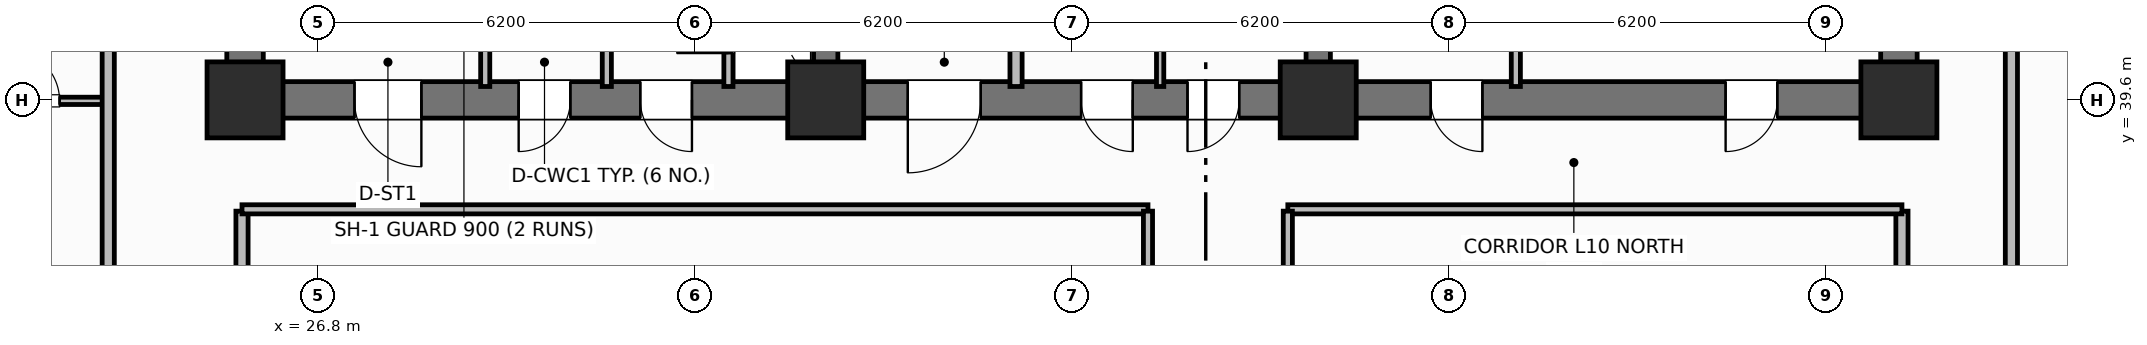
"""IFC4 building model, lengths in metres.
Left out: names, types, materials, properties, quantities, classifications, styles, units other than length and angle.
Written with IfcOpenShell. Run it as: python <this file> out.ifc"""

import sys

from ifc_helpers import new_model, si_unit, direction, frame, frame_2d, origin, origin_2d, place, context, subcontext, project, spatial, rectangle, extrude, element, fill, save


model = new_model("IFC4")
c1 = context("Model", 3, precision=1e-05, world=origin(), true_north=direction((0.0, 1.0)))
c2 = subcontext(c1, "Body", "Model", "MODEL_VIEW")
j1 = project(units=[si_unit("LENGTHUNIT", "METRE"), si_unit("PLANEANGLEUNIT", "RADIAN")], contexts=[c1])
p1 = place(None, origin())
s1 = spatial("IfcSite", under=j1, at=p1, CompositionType="ELEMENT")
p2 = place(p1, origin())
s2 = spatial("IfcBuilding", under=s1, at=p2, CompositionType="ELEMENT")
p3 = place(p2, frame((0.0, 0.0, 43.6)))
s3 = spatial("IfcBuildingStorey", under=s2, at=p3, CompositionType="ELEMENT", Elevation=43.6)
for number, where, z_axis, x_axis in (
    (1, (25.6, 39.9, 0.0), (0.0, 0.0, 1.0), (0.0, 1.0, 0.0)),
    (2, (52.8, 39.9, 0.0), (0.0, 0.0, 1.0), (0.0, 1.0, 0.0)),
):
    element("IfcWall", number, at=place(p3, frame(where, z_axis=z_axis, x_axis=x_axis)), inside=s3, PredefinedType="SHEAR", context=c2, shape_type="SweptSolid", body=[
        extrude(rectangle(XDim=5.6, YDim=0.6, at=frame_2d((2.8, 0.0))), origin(), (0.0, 0.0, 1.0), 3.7),
    ])
p4 = place(p3, frame((52.8, 39.6, 0.0), z_axis=(0.0, 0.0, 1.0), x_axis=(-1.0, 0.0, 0.0)))
e3 = element("IfcWall", 3, at=p4, inside=s3, PredefinedType="SHEAR", context=c2, shape_type="SweptSolid", body=[
    extrude(rectangle(XDim=27.2, YDim=0.6, at=frame_2d((13.6, 0.0))), origin(), (0.0, 0.0, 1.0), 3.7),
])
p5 = place(p4, frame((24.3, 0.0, 0.0)))
e4 = element("IfcOpeningElement", 4, at=p5, cuts=e3, PredefinedType="OPENING", context=c2, shape_type="SweptSolid", body=[
    extrude(rectangle(XDim=1.1, YDim=2.15, at=frame_2d((0.55, 1.075))), frame((0.0, 0.31, 0.0), z_axis=(0.0, -1.0, 0.0), x_axis=(1.0, 0.0, 0.0)), (0.0, 0.0, 1.0), 0.62),
])
p6 = place(p4, frame((21.85, 0.0, 0.0)))
e5 = element("IfcOpeningElement", 5, at=p6, cuts=e3, PredefinedType="OPENING", context=c2, shape_type="SweptSolid", body=[
    extrude(rectangle(XDim=0.85, YDim=2.1, at=frame_2d((0.425, 1.05))), frame((0.0, 0.31, 0.0), z_axis=(0.0, -1.0, 0.0), x_axis=(1.0, 0.0, 0.0)), (0.0, 0.0, 1.0), 0.62),
])
p7 = place(p4, frame((19.85, 0.0, 0.0)))
e6 = element("IfcOpeningElement", 6, at=p7, cuts=e3, PredefinedType="OPENING", context=c2, shape_type="SweptSolid", body=[
    extrude(rectangle(XDim=0.85, YDim=2.1, at=frame_2d((0.425, 1.05))), frame((0.0, 0.31, 0.0), z_axis=(0.0, -1.0, 0.0), x_axis=(1.0, 0.0, 0.0)), (0.0, 0.0, 1.0), 0.62),
])
p8 = place(p4, frame((15.1, 0.0, 0.0)))
e7 = element("IfcOpeningElement", 7, at=p8, cuts=e3, PredefinedType="OPENING", context=c2, shape_type="SweptSolid", body=[
    extrude(rectangle(XDim=1.2, YDim=2.15, at=frame_2d((0.6, 1.075))), frame((0.0, 0.31, 0.0), z_axis=(0.0, -1.0, 0.0), x_axis=(1.0, 0.0, 0.0)), (0.0, 0.0, 1.0), 0.62),
])
p9 = place(p4, frame((12.6, 0.0, 0.0)))
e8 = element("IfcOpeningElement", 8, at=p9, cuts=e3, PredefinedType="OPENING", context=c2, shape_type="SweptSolid", body=[
    extrude(rectangle(XDim=0.85, YDim=2.1, at=frame_2d((0.425, 1.05))), frame((0.0, 0.31, 0.0), z_axis=(0.0, -1.0, 0.0), x_axis=(1.0, 0.0, 0.0)), (0.0, 0.0, 1.0), 0.62),
])
p10 = place(p4, frame((10.85, 0.0, 0.0)))
e9 = element("IfcOpeningElement", 9, at=p10, cuts=e3, PredefinedType="OPENING", context=c2, shape_type="SweptSolid", body=[
    extrude(rectangle(XDim=0.85, YDim=2.1, at=frame_2d((0.425, 1.05))), frame((0.0, 0.31, 0.0), z_axis=(0.0, -1.0, 0.0), x_axis=(1.0, 0.0, 0.0)), (0.0, 0.0, 1.0), 0.62),
])
p11 = place(p4, frame((6.85, 0.0, 0.0)))
e10 = element("IfcOpeningElement", 10, at=p11, cuts=e3, PredefinedType="OPENING", context=c2, shape_type="SweptSolid", body=[
    extrude(rectangle(XDim=0.85, YDim=2.1, at=frame_2d((0.425, 1.05))), frame((0.0, 0.31, 0.0), z_axis=(0.0, -1.0, 0.0), x_axis=(1.0, 0.0, 0.0)), (0.0, 0.0, 1.0), 0.62),
])
p12 = place(p4, frame((2.0, 0.0, 0.0)))
e11 = element("IfcOpeningElement", 11, at=p12, cuts=e3, PredefinedType="OPENING", context=c2, shape_type="SweptSolid", body=[
    extrude(rectangle(XDim=0.85, YDim=2.1, at=frame_2d((0.425, 1.05))), frame((0.0, 0.31, 0.0), z_axis=(0.0, -1.0, 0.0), x_axis=(1.0, 0.0, 0.0)), (0.0, 0.0, 1.0), 0.62),
])
for number, where, z_axis, x_axis in (
    (12, (35.15, 39.9, 0.0), (0.0, 0.0, 1.0), (0.0, 1.0, 0.0)),
    (13, (43.25, 39.9, 0.0), (0.0, 0.0, 1.0), (0.0, 1.0, 0.0)),
):
    element("IfcWall", number, at=place(p3, frame(where, z_axis=z_axis, x_axis=x_axis)), inside=s3, PredefinedType="SHEAR", context=c2, shape_type="SweptSolid", body=[
        extrude(rectangle(XDim=5.6, YDim=0.4, at=frame_2d((2.8, 0.0))), origin(), (0.0, 0.0, 1.0), 3.7),
    ])
for number, where, z_axis, x_axis in (
    (14, (25.6, 39.6, 0.0), (0.0, 0.0, 1.0), (1.0, 0.0, 0.0)),
    (15, (35.15, 39.6, 0.0), (0.0, 0.0, 1.0), (1.0, 0.0, 0.0)),
    (16, (43.25, 39.6, 0.0), (0.0, 0.0, 1.0), (1.0, 0.0, 0.0)),
    (17, (52.8, 39.6, 0.0), (0.0, 0.0, 1.0), (1.0, 0.0, 0.0)),
):
    element("IfcColumn", number, at=place(p3, frame(where, z_axis=z_axis, x_axis=x_axis)), inside=s3, PredefinedType="COLUMN", context=c2, shape_type="SweptSolid", body=[
        extrude(rectangle(XDim=1.25, YDim=1.25, at=origin_2d()), origin(), (0.0, 0.0, 1.0), 3.7),
    ])
p13 = place(p3, frame((33.55, 39.82, 0.0), z_axis=(0.0, 0.0, 1.0), x_axis=(0.0, 1.0, 0.0)))
e18 = element("IfcWall", 18, at=p13, inside=s3, PredefinedType="PARTITIONING", context=c2, shape_type="SweptSolid", body=[
    extrude(rectangle(XDim=2.13, YDim=0.15, at=frame_2d((1.065, 0.0))), origin(), (0.0, 0.0, 1.0), 2.53),
])
p14 = place(p13, frame((0.55, 0.0, 0.0)))
e19 = element("IfcOpeningElement", 19, at=p14, cuts=e18, PredefinedType="OPENING", context=c2, shape_type="SweptSolid", body=[
    extrude(rectangle(XDim=0.85, YDim=2.05, at=frame_2d((0.425, 1.025))), frame((0.0, 0.085, 0.0), z_axis=(0.0, -1.0, 0.0), x_axis=(1.0, 0.0, 0.0)), (0.0, 0.0, 1.0), 0.17),
])
for number, where, z_axis, x_axis in (
    (20, (29.55, 39.82, 0.0), (0.0, 0.0, 1.0), (0.0, 1.0, 0.0)),
    (21, (31.55, 39.82, 0.0), (0.0, 0.0, 1.0), (0.0, 1.0, 0.0)),
):
    element("IfcWall", number, at=place(p3, frame(where, z_axis=z_axis, x_axis=x_axis)), inside=s3, PredefinedType="PARTITIONING", context=c2, shape_type="SweptSolid", body=[
        extrude(rectangle(XDim=2.13, YDim=0.15, at=frame_2d((1.065, 0.0))), origin(), (0.0, 0.0, 1.0), 2.53),
    ])
p15 = place(p3, frame((38.28, 39.82, 0.0), z_axis=(0.0, 0.0, 1.0), x_axis=(0.0, 1.0, 0.0)))
e22 = element("IfcWall", 22, at=p15, inside=s3, PredefinedType="PARTITIONING", context=c2, shape_type="SweptSolid", body=[
    extrude(rectangle(XDim=2.73, YDim=0.2, at=frame_2d((1.365, 0.0))), origin(), (0.0, 0.0, 1.0), 2.53),
])
p16 = place(p3, frame((40.65, 39.82, 0.0), z_axis=(0.0, 0.0, 1.0), x_axis=(0.0, 1.0, 0.0)))
e23 = element("IfcWall", 23, at=p16, inside=s3, PredefinedType="PARTITIONING", context=c2, shape_type="SweptSolid", body=[
    extrude(rectangle(XDim=2.73, YDim=0.12, at=frame_2d((1.365, 0.0))), origin(), (0.0, 0.0, 1.0), 2.53),
])
p17 = place(p3, frame((46.5, 39.82, 0.0), z_axis=(0.0, 0.0, 1.0), x_axis=(0.0, 1.0, 0.0)))
e24 = element("IfcWall", 24, at=p17, inside=s3, PredefinedType="PARTITIONING", context=c2, shape_type="SweptSolid", body=[
    extrude(rectangle(XDim=2.73, YDim=0.15, at=frame_2d((1.365, 0.0))), origin(), (0.0, 0.0, 1.0), 2.53),
])
for number, where, z_axis, x_axis in (
    (25, (25.55, 18.63, 0.0), (0.0, 0.0, 1.0), (0.0, 1.0, 0.0)),
    (26, (52.85, 18.63, 0.0), (0.0, 0.0, 1.0), (0.0, 1.0, 0.0)),
):
    element("IfcWall", number, at=place(p3, frame(where, z_axis=z_axis, x_axis=x_axis)), inside=s3, PredefinedType="PARTITIONING", context=c2, shape_type="SweptSolid", body=[
        extrude(rectangle(XDim=19.14, YDim=0.2, at=frame_2d((9.57, 0.0))), origin(), (0.0, 0.0, 1.0), 2.53),
    ])
p18 = place(p3, frame((25.55, 37.8, 0.0), z_axis=(0.0, 0.0, 1.0), x_axis=(1.0, 0.0, 0.0)))
e27 = element("IfcWall", 27, at=p18, inside=s3, PredefinedType="PARTITIONING", context=c2, shape_type="SweptSolid", body=[
    extrude(rectangle(XDim=14.9, YDim=0.15, at=frame_2d((7.45, 0.0))), origin(), (0.0, 0.0, 1.0), 2.53),
])
p19 = place(p3, frame((42.75, 37.8, 0.0), z_axis=(0.0, 0.0, 1.0), x_axis=(1.0, 0.0, 0.0)))
e28 = element("IfcWall", 28, at=p19, inside=s3, PredefinedType="PARTITIONING", context=c2, shape_type="SweptSolid", body=[
    extrude(rectangle(XDim=10.1, YDim=0.15, at=frame_2d((5.05, 0.0))), origin(), (0.0, 0.0, 1.0), 2.53),
])
p20 = place(p3, frame((40.45, 18.63, 0.0), z_axis=(0.0, 0.0, 1.0), x_axis=(0.0, 1.0, 0.0)))
e29 = element("IfcWall", 29, at=p20, inside=s3, PredefinedType="PARTITIONING", context=c2, shape_type="SweptSolid", body=[
    extrude(rectangle(XDim=19.14, YDim=0.15, at=frame_2d((9.57, 0.0))), origin(), (0.0, 0.0, 1.0), 2.53),
])
p21 = place(p20, frame((2.4, 0.0, 0.0)))
e30 = element("IfcOpeningElement", 30, at=p21, cuts=e29, PredefinedType="OPENING", context=c2, shape_type="SweptSolid", body=[
    extrude(rectangle(XDim=1.0, YDim=2.15, at=frame_2d((0.5, 1.075))), frame((0.0, 0.085, 0.0), z_axis=(0.0, -1.0, 0.0), x_axis=(1.0, 0.0, 0.0)), (0.0, 0.0, 1.0), 0.17),
])
p22 = place(p20, frame((11.4, 0.0, 0.0)))
e31 = element("IfcOpeningElement", 31, at=p22, cuts=e29, PredefinedType="OPENING", context=c2, shape_type="SweptSolid", body=[
    extrude(rectangle(XDim=1.0, YDim=2.15, at=frame_2d((0.5, 1.075))), frame((0.0, 0.085, 0.0), z_axis=(0.0, -1.0, 0.0), x_axis=(1.0, 0.0, 0.0)), (0.0, 0.0, 1.0), 0.17),
])
p23 = place(p3, frame((42.75, 18.63, 0.0), z_axis=(0.0, 0.0, 1.0), x_axis=(0.0, 1.0, 0.0)))
e32 = element("IfcWall", 32, at=p23, inside=s3, PredefinedType="PARTITIONING", context=c2, shape_type="SweptSolid", body=[
    extrude(rectangle(XDim=19.14, YDim=0.15, at=frame_2d((9.57, 0.0))), origin(), (0.0, 0.0, 1.0), 2.53),
])
p24 = place(p23, frame((5.5, 0.0, 0.0)))
e33 = element("IfcOpeningElement", 33, at=p24, cuts=e32, PredefinedType="OPENING", context=c2, shape_type="SweptSolid", body=[
    extrude(rectangle(XDim=1.0, YDim=2.15, at=frame_2d((0.5, 1.075))), frame((0.0, 0.085, 0.0), z_axis=(0.0, -1.0, 0.0), x_axis=(1.0, 0.0, 0.0)), (0.0, 0.0, 1.0), 0.17),
])
p25 = place(p3, frame((21.1, 39.584, 0.0), z_axis=(0.0, 0.0, 1.0), x_axis=(1.0, 0.0, 0.0)))
e34 = element("IfcWall", 34, at=p25, inside=s3, PredefinedType="PARTITIONING", context=c2, shape_type="SweptSolid", body=[
    extrude(rectangle(XDim=2.25, YDim=0.12, at=frame_2d((1.125, 0.0))), origin(), (0.0, 0.0, 1.0), 2.53),
])
p26 = place(p25, frame((0.6, 0.0, 0.0)))
e35 = element("IfcOpeningElement", 35, at=p26, cuts=e34, PredefinedType="OPENING", context=c2, shape_type="SweptSolid", body=[
    extrude(rectangle(XDim=0.85, YDim=2.1, at=frame_2d((0.425, 1.05))), frame((0.0, 0.07, 0.0), z_axis=(0.0, -1.0, 0.0), x_axis=(1.0, 0.0, 0.0)), (0.0, 0.0, 1.0), 0.14),
])
p27 = place(p3, frame((23.35, 10.6, 0.0), z_axis=(0.0, 0.0, 1.0), x_axis=(0.0, 1.0, 0.0)))
e36 = element("IfcWall", 36, at=p27, inside=s3, PredefinedType="PARTITIONING", context=c2, shape_type="SweptSolid", body=[
    extrude(rectangle(XDim=35.2, YDim=0.2, at=frame_2d((17.6, 0.0))), origin(), (0.0, 0.0, 1.0), 2.53),
])
p28 = place(p27, frame((2.65, 0.0, 0.0)))
e37 = element("IfcOpeningElement", 37, at=p28, cuts=e36, PredefinedType="OPENING", context=c2, shape_type="SweptSolid", body=[
    extrude(rectangle(XDim=1.0, YDim=2.15, at=frame_2d((0.5, 1.075))), frame((0.0, 0.11, 0.0), z_axis=(0.0, -1.0, 0.0), x_axis=(1.0, 0.0, 0.0)), (0.0, 0.0, 1.0), 0.22),
])
p29 = place(p27, frame((12.65, 0.0, 0.0)))
e38 = element("IfcOpeningElement", 38, at=p29, cuts=e36, PredefinedType="OPENING", context=c2, shape_type="SweptSolid", body=[
    extrude(rectangle(XDim=1.0, YDim=2.15, at=frame_2d((0.5, 1.075))), frame((0.0, 0.11, 0.0), z_axis=(0.0, -1.0, 0.0), x_axis=(1.0, 0.0, 0.0)), (0.0, 0.0, 1.0), 0.22),
])
p30 = place(p27, frame((24.134, 0.0, 0.0)))
e39 = element("IfcOpeningElement", 39, at=p30, cuts=e36, PredefinedType="OPENING", context=c2, shape_type="SweptSolid", body=[
    extrude(rectangle(XDim=1.0, YDim=2.15, at=frame_2d((0.5, 1.075))), frame((0.0, 0.11, 0.0), z_axis=(0.0, -1.0, 0.0), x_axis=(1.0, 0.0, 0.0)), (0.0, 0.0, 1.0), 0.22),
])
p31 = place(p3, frame((54.65, 10.6, 0.0), z_axis=(0.0, 0.0, 1.0), x_axis=(0.0, 1.0, 0.0)))
e40 = element("IfcWall", 40, at=p31, inside=s3, PredefinedType="PARTITIONING", context=c2, shape_type="SweptSolid", body=[
    extrude(rectangle(XDim=35.2, YDim=0.2, at=frame_2d((17.6, 0.0))), origin(), (0.0, 0.0, 1.0), 2.53),
])
p32 = place(p31, frame((2.65, 0.0, 0.0)))
e41 = element("IfcOpeningElement", 41, at=p32, cuts=e40, PredefinedType="OPENING", context=c2, shape_type="SweptSolid", body=[
    extrude(rectangle(XDim=1.0, YDim=2.15, at=frame_2d((0.5, 1.075))), frame((0.0, 0.11, 0.0), z_axis=(0.0, -1.0, 0.0), x_axis=(1.0, 0.0, 0.0)), (0.0, 0.0, 1.0), 0.22),
])
p33 = place(p31, frame((19.95, 0.0, 0.0)))
e42 = element("IfcOpeningElement", 42, at=p33, cuts=e40, PredefinedType="OPENING", context=c2, shape_type="SweptSolid", body=[
    extrude(rectangle(XDim=1.0, YDim=2.15, at=frame_2d((0.5, 1.075))), frame((0.0, 0.11, 0.0), z_axis=(0.0, -1.0, 0.0), x_axis=(1.0, 0.0, 0.0)), (0.0, 0.0, 1.0), 0.22),
])
p34 = place(p14, origin())
e43 = element("IfcDoor", 43, at=p34, inside=s3, OperationType="SINGLE_SWING_LEFT", PredefinedType="TRAPDOOR", context=c2, shape_type="SweptSolid", body=[
    extrude(rectangle(XDim=0.85, YDim=2.05, at=frame_2d((0.425, 1.025))), frame((0.0, 0.025, 0.0), z_axis=(0.0, -1.0, 0.0), x_axis=(1.0, 0.0, 0.0)), (0.0, 0.0, 1.0), 0.05),
])
fill(e19, e43)
p35 = place(p26, origin())
e44 = element("IfcDoor", 44, at=p35, inside=s3, OperationType="SINGLE_SWING_LEFT", PredefinedType="DOOR", context=c2, shape_type="SweptSolid", body=[
    extrude(rectangle(XDim=0.85, YDim=2.1, at=frame_2d((0.425, 1.05))), frame((0.0, 0.025, 0.0), z_axis=(0.0, -1.0, 0.0), x_axis=(1.0, 0.0, 0.0)), (0.0, 0.0, 1.0), 0.05),
])
fill(e35, e44)
p36 = place(p5, origin())
e45 = element("IfcDoor", 45, at=p36, inside=s3, OperationType="SINGLE_SWING_LEFT", PredefinedType="DOOR", context=c2, shape_type="SweptSolid", body=[
    extrude(rectangle(XDim=1.1, YDim=2.15, at=frame_2d((0.55, 1.075))), frame((0.0, 0.025, 0.0), z_axis=(0.0, -1.0, 0.0), x_axis=(1.0, 0.0, 0.0)), (0.0, 0.0, 1.0), 0.05),
])
fill(e4, e45)
p37 = place(p6, origin())
e46 = element("IfcDoor", 46, at=p37, inside=s3, OperationType="SINGLE_SWING_RIGHT", PredefinedType="DOOR", context=c2, shape_type="SweptSolid", body=[
    extrude(rectangle(XDim=0.85, YDim=2.1, at=frame_2d((0.425, 1.05))), frame((0.0, 0.025, 0.0), z_axis=(0.0, -1.0, 0.0), x_axis=(1.0, 0.0, 0.0)), (0.0, 0.0, 1.0), 0.05),
])
fill(e5, e46)
p38 = place(p7, origin())
e47 = element("IfcDoor", 47, at=p38, inside=s3, OperationType="SINGLE_SWING_LEFT", PredefinedType="DOOR", context=c2, shape_type="SweptSolid", body=[
    extrude(rectangle(XDim=0.85, YDim=2.1, at=frame_2d((0.425, 1.05))), frame((0.0, 0.025, 0.0), z_axis=(0.0, -1.0, 0.0), x_axis=(1.0, 0.0, 0.0)), (0.0, 0.0, 1.0), 0.05),
])
fill(e6, e47)
p39 = place(p8, origin())
e48 = element("IfcDoor", 48, at=p39, inside=s3, OperationType="SINGLE_SWING_RIGHT", PredefinedType="DOOR", context=c2, shape_type="SweptSolid", body=[
    extrude(rectangle(XDim=1.2, YDim=2.15, at=frame_2d((0.6, 1.075))), frame((0.0, 0.025, 0.0), z_axis=(0.0, -1.0, 0.0), x_axis=(1.0, 0.0, 0.0)), (0.0, 0.0, 1.0), 0.05),
])
fill(e7, e48)
p40 = place(p9, origin())
e49 = element("IfcDoor", 49, at=p40, inside=s3, OperationType="SINGLE_SWING_LEFT", PredefinedType="DOOR", context=c2, shape_type="SweptSolid", body=[
    extrude(rectangle(XDim=0.85, YDim=2.1, at=frame_2d((0.425, 1.05))), frame((0.0, 0.025, 0.0), z_axis=(0.0, -1.0, 0.0), x_axis=(1.0, 0.0, 0.0)), (0.0, 0.0, 1.0), 0.05),
])
fill(e8, e49)
p41 = place(p10, origin())
e50 = element("IfcDoor", 50, at=p41, inside=s3, OperationType="SINGLE_SWING_RIGHT", PredefinedType="DOOR", context=c2, shape_type="SweptSolid", body=[
    extrude(rectangle(XDim=0.85, YDim=2.1, at=frame_2d((0.425, 1.05))), frame((0.0, 0.025, 0.0), z_axis=(0.0, -1.0, 0.0), x_axis=(1.0, 0.0, 0.0)), (0.0, 0.0, 1.0), 0.05),
])
fill(e9, e50)
p42 = place(p11, origin())
e51 = element("IfcDoor", 51, at=p42, inside=s3, OperationType="SINGLE_SWING_LEFT", PredefinedType="DOOR", context=c2, shape_type="SweptSolid", body=[
    extrude(rectangle(XDim=0.85, YDim=2.1, at=frame_2d((0.425, 1.05))), frame((0.0, 0.025, 0.0), z_axis=(0.0, -1.0, 0.0), x_axis=(1.0, 0.0, 0.0)), (0.0, 0.0, 1.0), 0.05),
])
fill(e10, e51)
p43 = place(p12, origin())
e52 = element("IfcDoor", 52, at=p43, inside=s3, OperationType="SINGLE_SWING_RIGHT", PredefinedType="DOOR", context=c2, shape_type="SweptSolid", body=[
    extrude(rectangle(XDim=0.85, YDim=2.1, at=frame_2d((0.425, 1.05))), frame((0.0, 0.025, 0.0), z_axis=(0.0, -1.0, 0.0), x_axis=(1.0, 0.0, 0.0)), (0.0, 0.0, 1.0), 0.05),
])
fill(e11, e52)
save(model, sys.argv[1])
